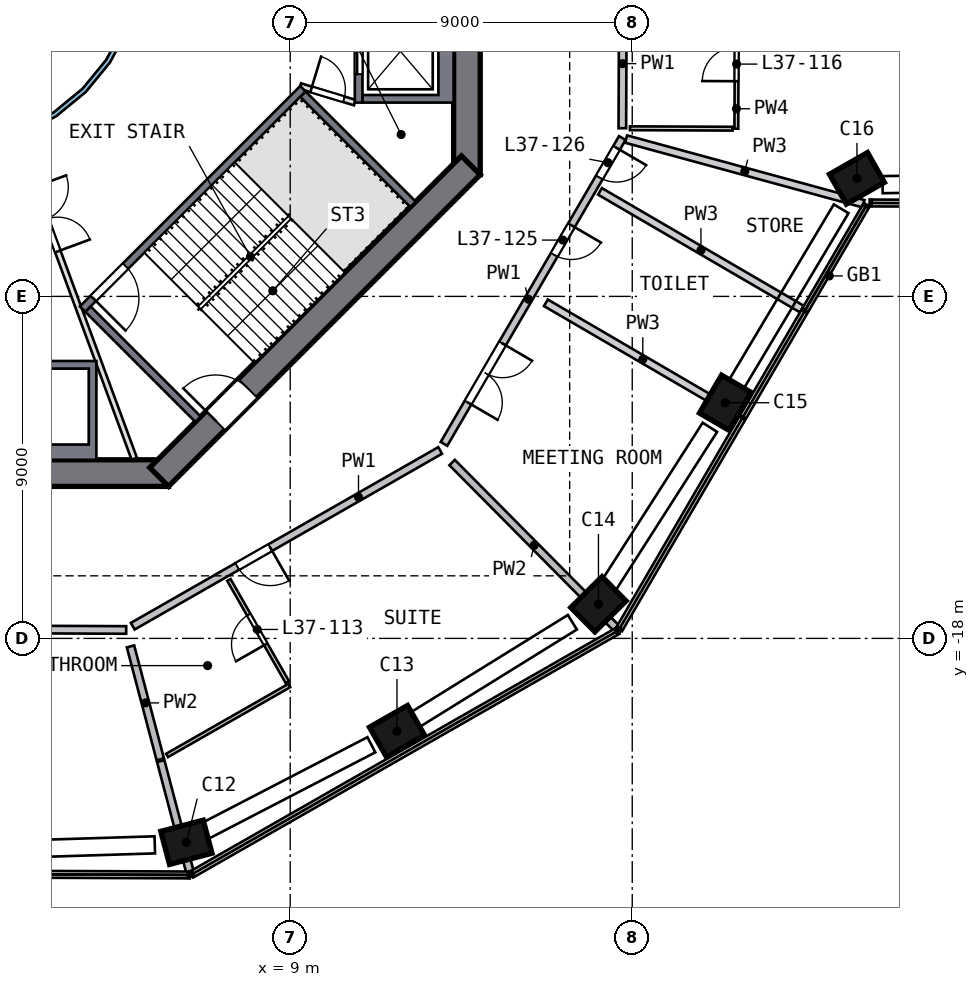
"""IFC4 building model, lengths in metres.
Left out: names, types, materials, properties, quantities, classifications, styles, units other than length and angle.
Written with IfcOpenShell. Run it as: python <this file> out.ifc"""

import sys

from ifc_helpers import new_model, si_unit, direction, frame, frame_2d, origin, origin_2d, place, context, subcontext, project, spatial, polyline, rectangle, outline, extrude, element, fill, save


model = new_model("IFC4")
c1 = context("Model", 3, precision=1e-05, world=origin(), true_north=direction((0.0, 1.0)))
c2 = subcontext(c1, "Body", "Model", "MODEL_VIEW")
j1 = project(units=[si_unit("LENGTHUNIT", "METRE"), si_unit("PLANEANGLEUNIT", "RADIAN")], contexts=[c1])
p1 = place(None, origin())
s1 = spatial("IfcSite", under=j1, at=p1, CompositionType="ELEMENT")
p2 = place(p1, origin())
s2 = spatial("IfcBuilding", under=s1, at=p2, CompositionType="ELEMENT")
p3 = place(p2, frame((0.0, 0.0, 154.0)))
s3 = spatial("IfcBuildingStorey", under=s2, at=p3, CompositionType="ELEMENT", Elevation=154.0)
p4 = place(p3, frame((6.164, -23.394, 0.0), z_axis=(0.086527935, 0.023561597, 0.995970766), x_axis=(-0.963156374, -0.253551051, 0.089675322)))
e1 = element("IfcColumn", 1, at=p4, inside=s3, PredefinedType="COLUMN", context=c2, shape_type="SweptSolid", body=[
    extrude(rectangle(XDim=1.15, YDim=0.9, at=origin_2d()), origin(), (0.0, 0.0, 1.0), 4.207),
])
p5 = place(p3, frame((11.719, -20.495, 0.0), z_axis=(0.075631969, 0.044113811, 0.996159514), x_axis=(0.864692618, 0.494611965, -0.087553873)))
e2 = element("IfcColumn", 2, at=p5, inside=s3, PredefinedType="COLUMN", context=c2, shape_type="SweptSolid", body=[
    extrude(rectangle(XDim=1.15, YDim=0.9, at=origin_2d()), origin(), (0.0, 0.0, 1.0), 4.206),
])
p6 = place(p3, frame((17.035, -17.178, 0.0), z_axis=(0.063198321, 0.063662588, 0.995968397), x_axis=(-0.707618105, -0.700878187, 0.089701637)))
e3 = element("IfcColumn", 3, at=p6, inside=s3, PredefinedType="COLUMN", context=c2, shape_type="SweptSolid", body=[
    extrude(rectangle(XDim=1.15, YDim=0.9, at=origin_2d()), origin(), (0.0, 0.0, 1.0), 4.207),
])
p7 = place(p3, frame((20.396, -11.89, 0.0), z_axis=(0.04347539, 0.075980354, 0.996161069), x_axis=(0.502014727, 0.860417708, -0.087536174)))
e4 = element("IfcColumn", 4, at=p7, inside=s3, PredefinedType="COLUMN", context=c2, shape_type="SweptSolid", body=[
    extrude(rectangle(XDim=1.15, YDim=0.9, at=origin_2d()), origin(), (0.0, 0.0, 1.0), 4.206),
])
p8 = place(p3, frame((23.887, -6.0, 0.0), z_axis=(0.021527251, 0.088720126, 0.995823939), x_axis=(-0.868632881, -0.491490043, 0.062565614)))
e5 = element("IfcColumn", 5, at=p8, inside=s3, PredefinedType="COLUMN", context=c2, shape_type="SweptSolid", body=[
    extrude(rectangle(XDim=1.15, YDim=0.9, at=origin_2d()), origin(), (0.0, 0.0, 1.0), 4.208),
])
p9 = place(p3, frame((13.65, -5.799, 0.0), z_axis=(0.0, 0.0, 1.0), x_axis=(0.0, 1.0, 0.0)))
e6 = element("IfcWall", 6, at=p9, inside=s3, PredefinedType="SHEAR", context=c2, shape_type="SweptSolid", body=[
    extrude(rectangle(XDim=11.598, YDim=0.7, at=frame_2d((5.799, 0.0))), origin(), (0.0, 0.0, 1.0), 4.5),
])
p10 = place(p9, frame((4.899, 0.0, 0.0)))
e7 = element("IfcOpeningElement", 7, at=p10, cuts=e6, PredefinedType="OPENING", context=c2, shape_type="SweptSolid", body=[
    extrude(rectangle(XDim=1.8, YDim=2.1, at=frame_2d((0.9, 1.05))), frame((0.0, 0.36, 0.0), z_axis=(0.0, -1.0, 0.0), x_axis=(1.0, 0.0, 0.0)), (0.0, 0.0, 1.0), 0.72),
])
p11 = place(p3, frame((-5.799, -13.65, 0.0), z_axis=(0.0, 0.0, 1.0), x_axis=(1.0, 0.0, 0.0)))
e8 = element("IfcWall", 8, at=p11, inside=s3, PredefinedType="SHEAR", context=c2, shape_type="SweptSolid", body=[
    extrude(rectangle(XDim=11.598, YDim=0.7, at=frame_2d((5.799, 0.0))), origin(), (0.0, 0.0, 1.0), 4.5),
])
p12 = place(p11, frame((4.899, 0.0, 0.0)))
e9 = element("IfcOpeningElement", 9, at=p12, cuts=e8, PredefinedType="OPENING", context=c2, shape_type="SweptSolid", body=[
    extrude(rectangle(XDim=1.8, YDim=2.1, at=frame_2d((0.9, 1.05))), frame((0.0, 0.36, 0.0), z_axis=(0.0, -1.0, 0.0), x_axis=(1.0, 0.0, 0.0)), (0.0, 0.0, 1.0), 0.72),
])
p13 = place(p3, frame((5.552, -13.752, 0.0), z_axis=(0.0, 0.0, 1.0), x_axis=(0.707106781, 0.707106781, 0.0)))
e10 = element("IfcWall", 10, at=p13, inside=s3, PredefinedType="SHEAR", context=c2, shape_type="SweptSolid", body=[
    extrude(rectangle(XDim=11.598, YDim=0.7, at=frame_2d((5.799, 0.0))), origin(), (0.0, 0.0, 1.0), 4.5),
])
p14 = place(p13, frame((2.099, 0.0, 0.0)))
e11 = element("IfcOpeningElement", 11, at=p14, cuts=e10, PredefinedType="OPENING", context=c2, shape_type="SweptSolid", body=[
    extrude(rectangle(XDim=1.2, YDim=2.1, at=frame_2d((0.6, 1.05))), frame((0.0, 0.36, 0.0), z_axis=(0.0, -1.0, 0.0), x_axis=(1.0, 0.0, 0.0)), (0.0, 0.0, 1.0), 0.72),
])
p15 = place(p3, origin())
e12 = element("IfcWall", 12, at=p15, inside=s3, PredefinedType="SOLIDWALL", context=c2, shape_type="SweptSolid", body=[
    extrude(outline(polyline([(13.3, -3.9), (10.9, -3.9), (10.9, -3.7), (12.9, -3.7), (12.9, -1.4), (10.9, -1.4), (10.9, -1.2), (13.3, -1.2), (13.3, -3.9)])), origin(), (0.0, 0.0, 1.0), 4.19),
])
p16 = place(p3, frame((10.8, -1.2, 0.0), z_axis=(0.0, 0.0, 1.0), x_axis=(0.0, -1.0, 0.0)))
e13 = element("IfcWall", 13, at=p16, inside=s3, PredefinedType="SOLIDWALL", context=c2, shape_type="SweptSolid", body=[
    extrude(rectangle(XDim=2.7, YDim=0.2, at=frame_2d((1.35, 0.0))), origin(), (0.0, 0.0, 1.0), 4.19),
])
p17 = place(p16, frame((0.75, 0.0, 0.0)))
e14 = element("IfcOpeningElement", 14, at=p17, cuts=e13, PredefinedType="OPENING", context=c2, shape_type="SweptSolid", body=[
    extrude(rectangle(XDim=1.2, YDim=2.1, at=frame_2d((0.6, 1.05))), frame((0.0, 0.11, 0.0), z_axis=(0.0, -1.0, 0.0), x_axis=(1.0, 0.0, 0.0)), (0.0, 0.0, 1.0), 0.22),
])
p18 = place(p3, origin())
e15 = element("IfcWall", 15, at=p18, inside=s3, PredefinedType="SOLIDWALL", context=c2, shape_type="SweptSolid", body=[
    extrude(outline(polyline([(3.9, -10.7), (3.9, -13.3), (1.2, -13.3), (1.2, -10.7), (3.9, -10.7)]), holes=[polyline([(1.4, -12.9), (3.7, -12.9), (3.7, -10.9), (1.4, -10.9), (1.4, -12.9)])]), origin(), (0.0, 0.0, 1.0), 4.19),
])
p19 = place(p3, frame((9.334, -3.535, 0.0), z_axis=(0.0, 0.0, 1.0), x_axis=(-0.707106781, -0.707106781, 0.0)))
e16 = element("IfcWall", 16, at=p19, inside=s3, PredefinedType="SOLIDWALL", context=c2, shape_type="SweptSolid", body=[
    extrude(rectangle(XDim=8.2, YDim=0.2, at=frame_2d((4.1, 0.0))), origin(), (0.0, 0.0, 1.0), 4.19),
])
p20 = place(p19, frame((6.6, 0.0, 0.0)))
e17 = element("IfcOpeningElement", 17, at=p20, cuts=e16, PredefinedType="OPENING", context=c2, shape_type="SweptSolid", body=[
    extrude(rectangle(XDim=1.2, YDim=2.1, at=frame_2d((0.6, 1.05))), frame((0.0, 0.11, 0.0), z_axis=(0.0, -1.0, 0.0), x_axis=(1.0, 0.0, 0.0)), (0.0, 0.0, 1.0), 0.22),
])
for number, where, z_axis, x_axis in (
    (18, (3.677, -9.334, 0.0), (0.0, 0.0, 1.0), (0.707, -0.707, 0.0)),
    (19, (9.334, -3.677, 0.0), (0.0, 0.0, 1.0), (0.707, -0.707, 0.0)),
):
    element("IfcWall", number, at=place(p3, frame(where, z_axis=z_axis, x_axis=x_axis)), inside=s3, PredefinedType="SOLIDWALL", context=c2, shape_type="SweptSolid", body=[
        extrude(rectangle(XDim=4.1, YDim=0.2, at=frame_2d((2.05, 0.0))), origin(), (0.0, 0.0, 1.0), 4.19),
    ])
p21 = place(p3, frame((9.263, -3.465, 0.0), z_axis=(0.0, 0.0, 1.0), x_axis=(0.957084567, -0.289808785, 0.0)))
e20 = element("IfcWall", 20, at=p21, inside=s3, PredefinedType="PARTITIONING", context=c2, shape_type="SweptSolid", body=[
    extrude(rectangle(XDim=1.501, YDim=0.15, at=frame_2d((0.75, 0.0))), origin(), (0.0, 0.0, 1.0), 4.19),
])
p22 = place(p21, frame((0.301, 0.0, 0.0)))
e21 = element("IfcOpeningElement", 21, at=p22, cuts=e20, PredefinedType="OPENING", context=c2, shape_type="SweptSolid", body=[
    extrude(rectangle(XDim=0.9, YDim=2.1, at=frame_2d((0.45, 1.05))), frame((0.0, 0.085, 0.0), z_axis=(0.0, -1.0, 0.0), x_axis=(1.0, 0.0, 0.0)), (0.0, 0.0, 1.0), 0.17),
])
p23 = place(p3, frame((1.776, -4.813, 0.0), z_axis=(0.0, 0.0, 1.0), x_axis=(0.346109381, -0.938194168, 0.0)))
e22 = element("IfcWall", 22, at=p23, inside=s3, PredefinedType="PARTITIONING", context=c2, shape_type="SweptSolid", body=[
    extrude(rectangle(XDim=9.016, YDim=0.15, at=frame_2d((4.508, 0.0))), origin(), (0.0, 0.0, 1.0), 4.19),
])
p24 = place(p23, frame((1.4, 0.0, 0.0)))
e23 = element("IfcOpeningElement", 23, at=p24, cuts=e22, PredefinedType="OPENING", context=c2, shape_type="SweptSolid", body=[
    extrude(rectangle(XDim=1.8, YDim=2.1, at=frame_2d((0.9, 1.05))), frame((0.0, 0.085, 0.0), z_axis=(0.0, -1.0, 0.0), x_axis=(1.0, 0.0, 0.0)), (0.0, 0.0, 1.0), 0.17),
])
p25 = place(p3, origin())
e24 = element("IfcWall", 24, at=p25, inside=s3, PredefinedType="SOLIDWALL", context=c2, shape_type="SweptSolid", body=[
    extrude(outline(polyline([(5.021, -0.999), (4.73, -1.959), (4.257, -2.844), (3.62, -3.62), (2.844, -4.257), (1.959, -4.73), (0.999, -5.021), (0.0, -5.12), (-0.999, -5.021), (-1.959, -4.73), (-2.844, -4.257), (-3.62, -3.62), (-4.257, -2.844), (-4.73, -1.959), (-5.021, -0.999), (-5.12, 0.0), (-5.021, 0.999), (-4.73, 1.959), (-4.257, 2.844), (-3.62, 3.62), (-2.844, 4.257), (-1.959, 4.73), (-0.999, 5.021), (0.0, 5.12), (0.999, 5.021), (1.959, 4.73), (2.844, 4.257), (3.62, 3.62), (4.257, 2.844), (4.73, 1.959), (5.021, 0.999), (5.12, 0.0), (5.021, -0.999)]), holes=[polyline([(4.904, 0.976), (4.619, 1.913), (4.157, 2.778), (3.535, 3.535), (2.778, 4.157), (1.913, 4.619), (0.976, 4.904), (0.0, 5.0), (-0.976, 4.904), (-1.913, 4.619), (-2.778, 4.157), (-3.535, 3.535), (-4.157, 2.778), (-4.619, 1.913), (-4.904, 0.976), (-5.0, 0.0), (-4.904, -0.976), (-4.619, -1.913), (-4.157, -2.778), (-3.535, -3.535), (-2.778, -4.157), (-1.913, -4.619), (-0.976, -4.904), (0.0, -5.0), (0.976, -4.904), (1.913, -4.619), (2.778, -4.157), (3.535, -3.535), (4.157, -2.778), (4.619, -1.913), (4.904, -0.976), (5.0, 0.0), (4.904, 0.976)])]), origin(), (0.0, 0.0, 1.0), 4.19),
])
p26 = place(p3, frame((4.684, -17.778, 0.0), z_axis=(0.0, 0.0, 1.0), x_axis=(-0.99999121, 0.004192835, 0.0)))
e25 = element("IfcWall", 25, at=p26, inside=s3, PredefinedType="SOLIDWALL", context=c2, shape_type="SweptSolid", body=[
    extrude(rectangle(XDim=9.316, YDim=0.2, at=frame_2d((4.658, 0.0))), origin(), (0.0, 0.0, 1.0), 4.19),
])
p27 = place(p26, frame((5.15, 0.0, 0.0)))
e26 = element("IfcOpeningElement", 26, at=p27, cuts=e25, PredefinedType="OPENING", context=c2, shape_type="SweptSolid", body=[
    extrude(rectangle(XDim=1.0, YDim=2.1, at=frame_2d((0.5, 1.05))), frame((0.0, 0.11, 0.0), z_axis=(0.0, -1.0, 0.0), x_axis=(1.0, 0.0, 0.0)), (0.0, 0.0, 1.0), 0.22),
])
p28 = place(p3, frame((12.945, -13.054, 0.0), z_axis=(0.0, 0.0, 1.0), x_axis=(-0.868115714, -0.496361872, 0.0)))
e27 = element("IfcWall", 27, at=p28, inside=s3, PredefinedType="SOLIDWALL", context=c2, shape_type="SweptSolid", body=[
    extrude(rectangle(XDim=9.316, YDim=0.2, at=frame_2d((4.658, 0.0))), origin(), (0.0, 0.0, 1.0), 4.19),
])
p29 = place(p28, frame((5.15, 0.0, 0.0)))
e28 = element("IfcOpeningElement", 28, at=p29, cuts=e27, PredefinedType="OPENING", context=c2, shape_type="SweptSolid", body=[
    extrude(rectangle(XDim=1.0, YDim=2.1, at=frame_2d((0.5, 1.05))), frame((0.0, 0.11, 0.0), z_axis=(0.0, -1.0, 0.0), x_axis=(1.0, 0.0, 0.0)), (0.0, 0.0, 1.0), 0.22),
])
p30 = place(p3, frame((17.738, -4.833, 0.0), z_axis=(0.0, 0.0, 1.0), x_axis=(-0.503629868, -0.863919531, 0.0)))
e29 = element("IfcWall", 29, at=p30, inside=s3, PredefinedType="SOLIDWALL", context=c2, shape_type="SweptSolid", body=[
    extrude(rectangle(XDim=9.317, YDim=0.2, at=frame_2d((4.658, 0.0))), origin(), (0.0, 0.0, 1.0), 4.19),
])
p31 = place(p30, frame((6.258, 0.0, 0.0)))
e30 = element("IfcOpeningElement", 30, at=p31, cuts=e29, PredefinedType="OPENING", context=c2, shape_type="SweptSolid", body=[
    extrude(rectangle(XDim=1.8, YDim=2.1, at=frame_2d((0.9, 1.05))), frame((0.0, 0.11, 0.0), z_axis=(0.0, -1.0, 0.0), x_axis=(1.0, 0.0, 0.0)), (0.0, 0.0, 1.0), 0.22),
])
p32 = place(p30, frame((2.658, 0.0, 0.0)))
e31 = element("IfcOpeningElement", 31, at=p32, cuts=e29, PredefinedType="OPENING", context=c2, shape_type="SweptSolid", body=[
    extrude(rectangle(XDim=0.9, YDim=2.1, at=frame_2d((0.45, 1.05))), frame((0.0, 0.11, 0.0), z_axis=(0.0, -1.0, 0.0), x_axis=(1.0, 0.0, 0.0)), (0.0, 0.0, 1.0), 0.22),
])
p33 = place(p30, frame((0.3, 0.0, 0.0)))
e32 = element("IfcOpeningElement", 32, at=p33, cuts=e29, PredefinedType="OPENING", context=c2, shape_type="SweptSolid", body=[
    extrude(rectangle(XDim=0.9, YDim=2.1, at=frame_2d((0.45, 1.05))), frame((0.0, 0.11, 0.0), z_axis=(0.0, -1.0, 0.0), x_axis=(1.0, 0.0, 0.0)), (0.0, 0.0, 1.0), 0.22),
])
p34 = place(p3, frame((17.739, -4.574, 0.0), z_axis=(0.0, 0.0, 1.0), x_axis=(0.004236642, 0.999991025, 0.0)))
e33 = element("IfcWall", 33, at=p34, inside=s3, PredefinedType="SOLIDWALL", context=c2, shape_type="SweptSolid", body=[
    extrude(rectangle(XDim=3.4, YDim=0.2, at=frame_2d((1.7, 0.0))), origin(), (0.0, 0.0, 1.0), 4.19),
])
p35 = place(p3, frame((4.798, -18.211, 0.0), z_axis=(0.0, 0.0, 1.0), x_axis=(0.254809876, -0.966991172, 0.0)))
e34 = element("IfcWall", 34, at=p35, inside=s3, PredefinedType="SOLIDWALL", context=c2, shape_type="SweptSolid", body=[
    extrude(rectangle(XDim=3.075, YDim=0.2, at=frame_2d((1.537, 0.0))), origin(), (0.0, 0.0, 1.0), 4.19),
])
p36 = place(p3, frame((5.593, -21.228, 0.0), z_axis=(0.0, 0.0, 1.0), x_axis=(0.254744714, -0.967008341, 0.0)))
e35 = element("IfcWall", 35, at=p36, inside=s3, PredefinedType="SOLIDWALL", context=c2, shape_type="SweptSolid", body=[
    extrude(rectangle(XDim=3.011, YDim=0.2, at=frame_2d((1.506, 0.0))), origin(), (0.0, 0.0, 1.0), 4.19),
])
p37 = place(p3, frame((17.578, -17.726, 0.0), z_axis=(0.0, 0.0, 1.0), x_axis=(-0.70411441, 0.710086542, 0.0)))
e36 = element("IfcWall", 36, at=p37, inside=s3, PredefinedType="SOLIDWALL", context=c2, shape_type="SweptSolid", body=[
    extrude(rectangle(XDim=6.132, YDim=0.2, at=frame_2d((3.066, 0.0))), origin(), (0.0, 0.0, 1.0), 4.19),
])
p38 = place(p3, frame((8.976, -19.24, 0.0), z_axis=(0.0, 0.0, 1.0), x_axis=(-0.86809302, -0.496401559, 0.0)))
e37 = element("IfcWall", 37, at=p38, inside=s3, PredefinedType="PARTITIONING", context=c2, shape_type="SweptSolid", body=[
    extrude(rectangle(XDim=3.704, YDim=0.1, at=frame_2d((1.852, 0.0))), origin(), (0.0, 0.0, 1.0), 4.19),
])
p39 = place(p3, frame((8.926, -19.154, 0.0), z_axis=(0.0, 0.0, 1.0), x_axis=(-0.496384872, 0.868102562, 0.0)))
e38 = element("IfcWall", 38, at=p39, inside=s3, PredefinedType="PARTITIONING", context=c2, shape_type="SweptSolid", body=[
    extrude(rectangle(XDim=3.1, YDim=0.1, at=frame_2d((1.55, 0.0))), origin(), (0.0, 0.0, 1.0), 4.19),
])
p40 = place(p39, frame((1.15, 0.0, 0.0)))
e39 = element("IfcOpeningElement", 39, at=p40, cuts=e38, PredefinedType="OPENING", context=c2, shape_type="SweptSolid", body=[
    extrude(rectangle(XDim=0.9, YDim=2.1, at=frame_2d((0.45, 1.05))), frame((0.0, 0.06, 0.0), z_axis=(0.0, -1.0, 0.0), x_axis=(1.0, 0.0, 0.0)), (0.0, 0.0, 1.0), 0.12),
])
p41 = place(p3, frame((20.639, -4.586, 0.0), z_axis=(0.0, 0.0, 1.0), x_axis=(-0.999991351, 0.004159096, 0.0)))
e40 = element("IfcWall", 40, at=p41, inside=s3, PredefinedType="PARTITIONING", context=c2, shape_type="SweptSolid", body=[
    extrude(rectangle(XDim=2.7, YDim=0.1, at=frame_2d((1.35, 0.0))), origin(), (0.0, 0.0, 1.0), 4.19),
])
p42 = place(p3, frame((20.739, -4.587, 0.0), z_axis=(0.0, 0.0, 1.0), x_axis=(0.004196194, 0.999991196, 0.0)))
e41 = element("IfcWall", 41, at=p42, inside=s3, PredefinedType="PARTITIONING", context=c2, shape_type="SweptSolid", body=[
    extrude(rectangle(XDim=3.2, YDim=0.1, at=frame_2d((1.6, 0.0))), origin(), (0.0, 0.0, 1.0), 4.19),
])
p43 = place(p42, frame((1.25, 0.0, 0.0)))
e42 = element("IfcOpeningElement", 42, at=p43, cuts=e41, PredefinedType="OPENING", context=c2, shape_type="SweptSolid", body=[
    extrude(rectangle(XDim=0.9, YDim=2.1, at=frame_2d((0.45, 1.05))), frame((0.0, 0.06, 0.0), z_axis=(0.0, -1.0, 0.0), x_axis=(1.0, 0.0, 0.0)), (0.0, 0.0, 1.0), 0.12),
])
p44 = place(p3, frame((15.728, -9.169, 0.0), z_axis=(0.0, 0.0, 1.0), x_axis=(0.863906385, -0.503652418, 0.0)))
e43 = element("IfcWall", 43, at=p44, inside=s3, PredefinedType="SOLIDWALL", context=c2, shape_type="SweptSolid", body=[
    extrude(rectangle(XDim=5.903, YDim=0.2, at=frame_2d((2.951, 0.0))), origin(), (0.0, 0.0, 1.0), 4.19),
])
p45 = place(p3, frame((17.151, -6.237, 0.0), z_axis=(0.0, 0.0, 1.0), x_axis=(0.863935798, -0.503601963, 0.0)))
e44 = element("IfcWall", 44, at=p45, inside=s3, PredefinedType="SOLIDWALL", context=c2, shape_type="SweptSolid", body=[
    extrude(rectangle(XDim=6.15, YDim=0.2, at=frame_2d((3.075, 0.0))), origin(), (0.0, 0.0, 1.0), 4.19),
])
p46 = place(p3, frame((17.838, -4.86, 0.0), z_axis=(0.0, 0.0, 1.0), x_axis=(0.964836865, -0.262849431, 0.0)))
e45 = element("IfcWall", 45, at=p46, inside=s3, PredefinedType="SOLIDWALL", context=c2, shape_type="SweptSolid", body=[
    extrude(rectangle(XDim=6.476, YDim=0.2, at=frame_2d((3.238, 0.0))), origin(), (0.0, 0.0, 1.0), 4.19),
])
p47 = place(p17, origin())
e46 = element("IfcDoor", 46, at=p47, inside=s3, OperationType="DOUBLE_DOOR_SLIDING", PredefinedType="DOOR", context=c2, shape_type="SweptSolid", body=[
    extrude(rectangle(XDim=1.2, YDim=2.1, at=frame_2d((0.6, 1.05))), frame((0.0, 0.025, 0.0), z_axis=(0.0, -1.0, 0.0), x_axis=(1.0, 0.0, 0.0)), (0.0, 0.0, 1.0), 0.05),
])
fill(e14, e46)
p48 = place(p20, origin())
e47 = element("IfcDoor", 47, at=p48, inside=s3, OperationType="SINGLE_SWING_RIGHT", PredefinedType="DOOR", context=c2, shape_type="SweptSolid", body=[
    extrude(rectangle(XDim=1.2, YDim=2.1, at=frame_2d((0.6, 1.05))), frame((0.0, 0.025, 0.0), z_axis=(0.0, -1.0, 0.0), x_axis=(1.0, 0.0, 0.0)), (0.0, 0.0, 1.0), 0.05),
])
fill(e17, e47)
p49 = place(p14, origin())
e48 = element("IfcDoor", 48, at=p49, inside=s3, OperationType="SINGLE_SWING_LEFT", PredefinedType="DOOR", context=c2, shape_type="SweptSolid", body=[
    extrude(rectangle(XDim=1.2, YDim=2.1, at=frame_2d((0.6, 1.05))), frame((0.0, 0.025, 0.0), z_axis=(0.0, -1.0, 0.0), x_axis=(1.0, 0.0, 0.0)), (0.0, 0.0, 1.0), 0.05),
])
fill(e11, e48)
p50 = place(p22, origin())
e49 = element("IfcDoor", 49, at=p50, inside=s3, OperationType="SINGLE_SWING_LEFT", PredefinedType="DOOR", context=c2, shape_type="SweptSolid", body=[
    extrude(rectangle(XDim=0.9, YDim=2.1, at=frame_2d((0.45, 1.05))), frame((0.0, 0.025, 0.0), z_axis=(0.0, -1.0, 0.0), x_axis=(1.0, 0.0, 0.0)), (0.0, 0.0, 1.0), 0.05),
])
fill(e21, e49)
p51 = place(p24, origin())
e50 = element("IfcDoor", 50, at=p51, inside=s3, OperationType="DOUBLE_DOOR_SINGLE_SWING", PredefinedType="DOOR", context=c2, shape_type="SweptSolid", body=[
    extrude(rectangle(XDim=1.8, YDim=2.1, at=frame_2d((0.9, 1.05))), frame((0.0, 0.025, 0.0), z_axis=(0.0, -1.0, 0.0), x_axis=(1.0, 0.0, 0.0)), (0.0, 0.0, 1.0), 0.05),
])
fill(e23, e50)
p52 = place(p29, origin())
e51 = element("IfcDoor", 51, at=p52, inside=s3, OperationType="SINGLE_SWING_LEFT", PredefinedType="DOOR", context=c2, shape_type="SweptSolid", body=[
    extrude(rectangle(XDim=1.0, YDim=2.1, at=frame_2d((0.5, 1.05))), frame((0.0, 0.025, 0.0), z_axis=(0.0, -1.0, 0.0), x_axis=(1.0, 0.0, 0.0)), (0.0, 0.0, 1.0), 0.05),
])
fill(e28, e51)
p53 = place(p40, origin())
e52 = element("IfcDoor", 52, at=p53, inside=s3, OperationType="SINGLE_SWING_LEFT", PredefinedType="DOOR", context=c2, shape_type="SweptSolid", body=[
    extrude(rectangle(XDim=0.9, YDim=2.1, at=frame_2d((0.45, 1.05))), frame((0.0, 0.025, 0.0), z_axis=(0.0, -1.0, 0.0), x_axis=(1.0, 0.0, 0.0)), (0.0, 0.0, 1.0), 0.05),
])
fill(e39, e52)
p54 = place(p31, origin())
e53 = element("IfcDoor", 53, at=p54, inside=s3, OperationType="DOUBLE_DOOR_SINGLE_SWING", PredefinedType="DOOR", context=c2, shape_type="SweptSolid", body=[
    extrude(rectangle(XDim=1.8, YDim=2.1, at=frame_2d((0.9, 1.05))), frame((0.0, 0.025, 0.0), z_axis=(0.0, -1.0, 0.0), x_axis=(1.0, 0.0, 0.0)), (0.0, 0.0, 1.0), 0.05),
])
fill(e30, e53)
p55 = place(p43, origin())
e54 = element("IfcDoor", 54, at=p55, inside=s3, OperationType="SINGLE_SWING_LEFT", PredefinedType="DOOR", context=c2, shape_type="SweptSolid", body=[
    extrude(rectangle(XDim=0.9, YDim=2.1, at=frame_2d((0.45, 1.05))), frame((0.0, 0.025, 0.0), z_axis=(0.0, -1.0, 0.0), x_axis=(1.0, 0.0, 0.0)), (0.0, 0.0, 1.0), 0.05),
])
fill(e42, e54)
p56 = place(p32, origin())
e55 = element("IfcDoor", 55, at=p56, inside=s3, OperationType="SINGLE_SWING_LEFT", PredefinedType="DOOR", context=c2, shape_type="SweptSolid", body=[
    extrude(rectangle(XDim=0.9, YDim=2.1, at=frame_2d((0.45, 1.05))), frame((0.0, 0.025, 0.0), z_axis=(0.0, -1.0, 0.0), x_axis=(1.0, 0.0, 0.0)), (0.0, 0.0, 1.0), 0.05),
])
fill(e31, e55)
p57 = place(p33, origin())
e56 = element("IfcDoor", 56, at=p57, inside=s3, OperationType="SINGLE_SWING_LEFT", PredefinedType="DOOR", context=c2, shape_type="SweptSolid", body=[
    extrude(rectangle(XDim=0.9, YDim=2.1, at=frame_2d((0.45, 1.05))), frame((0.0, 0.025, 0.0), z_axis=(0.0, -1.0, 0.0), x_axis=(1.0, 0.0, 0.0)), (0.0, 0.0, 1.0), 0.05),
])
fill(e32, e56)
save(model, sys.argv[1])
